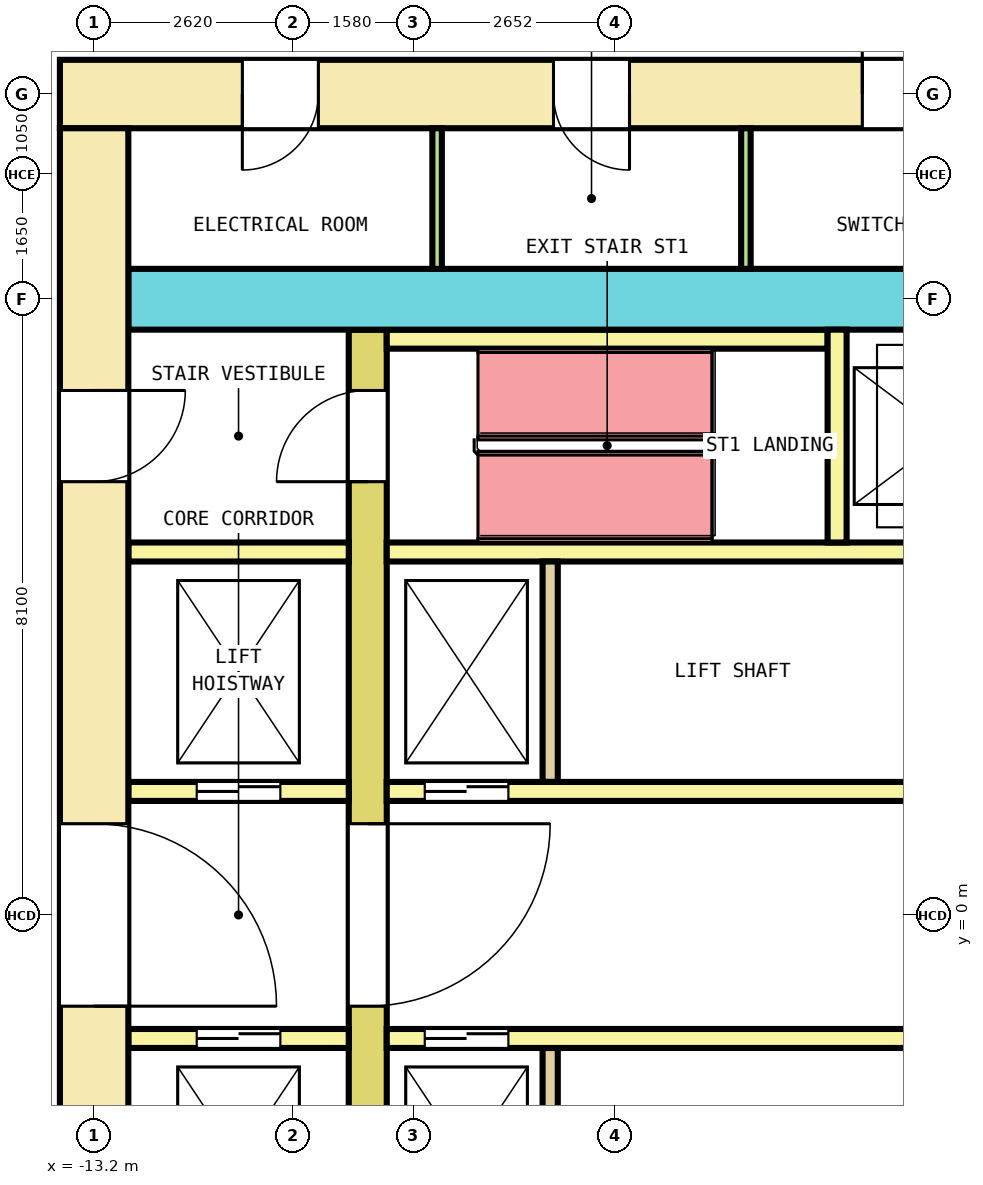
"""IFC4 building model, lengths in metres.
Left out: names, types, materials, properties, quantities, classifications, styles, units other than length and angle.
Written with IfcOpenShell. Run it as: python <this file> out.ifc"""

import sys

from ifc_helpers import new_model, si_unit, direction, frame, frame_2d, origin, place, context, subcontext, project, spatial, rectangle, extrude, element, fill, save


model = new_model("IFC4")
c1 = context("Model", 3, precision=1e-05, world=origin(), true_north=direction((0.0, 1.0)))
c2 = subcontext(c1, "Body", "Model", "MODEL_VIEW")
j1 = project(units=[si_unit("LENGTHUNIT", "METRE"), si_unit("PLANEANGLEUNIT", "RADIAN")], contexts=[c1])
p1 = place(None, origin())
s1 = spatial("IfcSite", under=j1, at=p1, CompositionType="ELEMENT")
p2 = place(p1, origin())
s2 = spatial("IfcBuilding", under=s1, at=p2, CompositionType="ELEMENT")
p3 = place(p2, frame((0.0, 0.0, 49.8)))
s3 = spatial("IfcBuildingStorey", under=s2, at=p3, CompositionType="ELEMENT", Elevation=49.8)
p4 = place(p3, frame((-13.65, 10.8, 0.0), z_axis=(0.0, 0.0, 1.0), x_axis=(1.0, 0.0, 0.0)))
e1 = element("IfcWall", 1, at=p4, inside=s3, PredefinedType="SHEAR", context=c2, shape_type="SweptSolid", body=[
    extrude(rectangle(XDim=27.3, YDim=0.9, at=frame_2d((13.65, 0.0))), origin(), (0.0, 0.0, 1.0), 4.1),
])
p5 = place(p4, frame((2.4, 0.0, 0.0)))
e2 = element("IfcOpeningElement", 2, at=p5, cuts=e1, PredefinedType="OPENING", context=c2, shape_type="SweptSolid", body=[
    extrude(rectangle(XDim=1.0, YDim=2.1, at=frame_2d((0.5, 1.05))), frame((0.0, 0.46, 0.0), z_axis=(0.0, -1.0, 0.0), x_axis=(1.0, 0.0, 0.0)), (0.0, 0.0, 1.0), 0.92),
])
p6 = place(p4, frame((6.494, 0.0, 0.0)))
e3 = element("IfcOpeningElement", 3, at=p6, cuts=e1, PredefinedType="OPENING", context=c2, shape_type="SweptSolid", body=[
    extrude(rectangle(XDim=1.0, YDim=2.1, at=frame_2d((0.5, 1.05))), frame((0.0, 0.46, 0.0), z_axis=(0.0, -1.0, 0.0), x_axis=(1.0, 0.0, 0.0)), (0.0, 0.0, 1.0), 0.92),
])
p7 = place(p4, frame((10.556, 0.0, 0.0)))
e4 = element("IfcOpeningElement", 4, at=p7, cuts=e1, PredefinedType="OPENING", context=c2, shape_type="SweptSolid", body=[
    extrude(rectangle(XDim=1.0, YDim=2.1, at=frame_2d((0.5, 1.05))), frame((0.0, 0.46, 0.0), z_axis=(0.0, -1.0, 0.0), x_axis=(1.0, 0.0, 0.0)), (0.0, 0.0, 1.0), 0.92),
])
p8 = place(p4, frame((18.077, 0.0, 0.0)))
e5 = element("IfcOpeningElement", 5, at=p8, cuts=e1, PredefinedType="OPENING", context=c2, shape_type="SweptSolid", body=[
    extrude(rectangle(XDim=1.0, YDim=2.1, at=frame_2d((0.5, 1.05))), frame((0.0, 0.46, 0.0), z_axis=(0.0, -1.0, 0.0), x_axis=(1.0, 0.0, 0.0)), (0.0, 0.0, 1.0), 0.92),
])
p9 = place(p4, frame((21.206, 0.0, 0.0)))
e6 = element("IfcOpeningElement", 6, at=p9, cuts=e1, PredefinedType="OPENING", context=c2, shape_type="SweptSolid", body=[
    extrude(rectangle(XDim=1.0, YDim=2.1, at=frame_2d((0.5, 1.05))), frame((0.0, 0.46, 0.0), z_axis=(0.0, -1.0, 0.0), x_axis=(1.0, 0.0, 0.0)), (0.0, 0.0, 1.0), 0.92),
])
p10 = place(p4, frame((24.367, 0.0, 0.0)))
e7 = element("IfcOpeningElement", 7, at=p10, cuts=e1, PredefinedType="OPENING", context=c2, shape_type="SweptSolid", body=[
    extrude(rectangle(XDim=1.0, YDim=2.1, at=frame_2d((0.5, 1.05))), frame((0.0, 0.46, 0.0), z_axis=(0.0, -1.0, 0.0), x_axis=(1.0, 0.0, 0.0)), (0.0, 0.0, 1.0), 0.92),
])
p11 = place(p4, frame((14.575, 0.0, 0.0)))
e8 = element("IfcOpeningElement", 8, at=p11, cuts=e1, PredefinedType="OPENING", context=c2, shape_type="SweptSolid", body=[
    extrude(rectangle(XDim=1.4, YDim=2.1, at=frame_2d((0.7, 1.05))), frame((0.0, 0.46, 0.0), z_axis=(0.0, -1.0, 0.0), x_axis=(1.0, 0.0, 0.0)), (0.0, 0.0, 1.0), 0.92),
])
p12 = place(p3, frame((-13.2, -10.35, 0.0), z_axis=(0.0, 0.0, 1.0), x_axis=(0.0, 1.0, 0.0)))
e9 = element("IfcWall", 9, at=p12, inside=s3, PredefinedType="SHEAR", context=c2, shape_type="SweptSolid", body=[
    extrude(rectangle(XDim=20.7, YDim=0.9, at=frame_2d((10.35, 0.0))), origin(), (0.0, 0.0, 1.0), 4.1),
])
p13 = place(p12, frame((9.15, 0.0, 0.0)))
e10 = element("IfcOpeningElement", 10, at=p13, cuts=e9, PredefinedType="OPENING", context=c2, shape_type="SweptSolid", body=[
    extrude(rectangle(XDim=2.4, YDim=2.1, at=frame_2d((1.2, 1.05))), frame((0.0, 0.46, 0.0), z_axis=(0.0, -1.0, 0.0), x_axis=(1.0, 0.0, 0.0)), (0.0, 0.0, 1.0), 0.92),
])
p14 = place(p12, frame((16.05, 0.0, 0.0)))
e11 = element("IfcOpeningElement", 11, at=p14, cuts=e9, PredefinedType="OPENING", context=c2, shape_type="SweptSolid", body=[
    extrude(rectangle(XDim=1.2, YDim=2.1, at=frame_2d((0.6, 1.05))), frame((0.0, 0.46, 0.0), z_axis=(0.0, -1.0, 0.0), x_axis=(1.0, 0.0, 0.0)), (0.0, 0.0, 1.0), 0.92),
])
p15 = place(p12, frame((3.45, 0.0, 0.0)))
e12 = element("IfcOpeningElement", 12, at=p15, cuts=e9, PredefinedType="OPENING", context=c2, shape_type="SweptSolid", body=[
    extrude(rectangle(XDim=1.2, YDim=2.1, at=frame_2d((0.6, 1.05))), frame((0.0, 0.46, 0.0), z_axis=(0.0, -1.0, 0.0), x_axis=(1.0, 0.0, 0.0)), (0.0, 0.0, 1.0), 0.92),
])
p16 = place(p3, frame((-12.75, 8.1, 0.0), z_axis=(0.0, 0.0, 1.0), x_axis=(1.0, 0.0, 0.0)))
e13 = element("IfcWall", 13, at=p16, inside=s3, PredefinedType="SHEAR", context=c2, shape_type="SweptSolid", body=[
    extrude(rectangle(XDim=25.5, YDim=0.8, at=frame_2d((12.75, 0.0))), origin(), (0.0, 0.0, 1.0), 4.1),
])
p17 = place(p16, frame((13.675, 0.0, 0.0)))
e14 = element("IfcOpeningElement", 14, at=p17, cuts=e13, PredefinedType="OPENING", context=c2, shape_type="SweptSolid", body=[
    extrude(rectangle(XDim=1.4, YDim=2.1, at=frame_2d((0.7, 1.05))), frame((0.0, 0.41, 0.0), z_axis=(0.0, -1.0, 0.0), x_axis=(1.0, 0.0, 0.0)), (0.0, 0.0, 1.0), 0.82),
])
p18 = place(p3, frame((-9.6, -7.7, 0.0), z_axis=(0.0, 0.0, 1.0), x_axis=(0.0, 1.0, 0.0)))
e15 = element("IfcWall", 15, at=p18, inside=s3, PredefinedType="SHEAR", context=c2, shape_type="SweptSolid", body=[
    extrude(rectangle(XDim=15.4, YDim=0.5, at=frame_2d((7.7, 0.0))), origin(), (0.0, 0.0, 1.0), 4.1),
])
p19 = place(p18, frame((6.5, 0.0, 0.0)))
e16 = element("IfcOpeningElement", 16, at=p19, cuts=e15, PredefinedType="OPENING", context=c2, shape_type="SweptSolid", body=[
    extrude(rectangle(XDim=2.4, YDim=2.1, at=frame_2d((1.2, 1.05))), frame((0.0, 0.26, 0.0), z_axis=(0.0, -1.0, 0.0), x_axis=(1.0, 0.0, 0.0)), (0.0, 0.0, 1.0), 0.52),
])
p20 = place(p18, frame((13.4, 0.0, 0.0)))
e17 = element("IfcOpeningElement", 17, at=p20, cuts=e15, PredefinedType="OPENING", context=c2, shape_type="SweptSolid", body=[
    extrude(rectangle(XDim=1.2, YDim=2.1, at=frame_2d((0.6, 1.05))), frame((0.0, 0.26, 0.0), z_axis=(0.0, -1.0, 0.0), x_axis=(1.0, 0.0, 0.0)), (0.0, 0.0, 1.0), 0.52),
])
p21 = place(p18, frame((0.8, 0.0, 0.0)))
e18 = element("IfcOpeningElement", 18, at=p21, cuts=e15, PredefinedType="OPENING", context=c2, shape_type="SweptSolid", body=[
    extrude(rectangle(XDim=1.2, YDim=2.1, at=frame_2d((0.6, 1.05))), frame((0.0, 0.26, 0.0), z_axis=(0.0, -1.0, 0.0), x_axis=(1.0, 0.0, 0.0)), (0.0, 0.0, 1.0), 0.52),
])
p22 = place(p3, frame((-12.75, 1.625, 0.0), z_axis=(0.0, 0.0, 1.0), x_axis=(1.0, 0.0, 0.0)))
e19 = element("IfcWall", 19, at=p22, inside=s3, PredefinedType="SOLIDWALL", context=c2, shape_type="SweptSolid", body=[
    extrude(rectangle(XDim=2.9, YDim=0.25, at=frame_2d((1.45, 0.0))), origin(), (0.0, 0.0, 1.0), 4.1),
])
p23 = place(p22, frame((0.9, 0.0, 0.0)))
e20 = element("IfcOpeningElement", 20, at=p23, cuts=e19, PredefinedType="OPENING", context=c2, shape_type="SweptSolid", body=[
    extrude(rectangle(XDim=1.1, YDim=2.1, at=frame_2d((0.55, 1.05))), frame((0.0, 0.135, 0.0), z_axis=(0.0, -1.0, 0.0), x_axis=(1.0, 0.0, 0.0)), (0.0, 0.0, 1.0), 0.27),
])
p24 = place(p3, frame((-9.35, 1.625, 0.0), z_axis=(0.0, 0.0, 1.0), x_axis=(1.0, 0.0, 0.0)))
e21 = element("IfcWall", 21, at=p24, inside=s3, PredefinedType="SOLIDWALL", context=c2, shape_type="SweptSolid", body=[
    extrude(rectangle(XDim=18.7, YDim=0.25, at=frame_2d((9.35, 0.0))), origin(), (0.0, 0.0, 1.0), 4.1),
])
p25 = place(p24, frame((0.5, 0.0, 0.0)))
e22 = element("IfcOpeningElement", 22, at=p25, cuts=e21, PredefinedType="OPENING", context=c2, shape_type="SweptSolid", body=[
    extrude(rectangle(XDim=1.1, YDim=2.1, at=frame_2d((0.55, 1.05))), frame((0.0, 0.135, 0.0), z_axis=(0.0, -1.0, 0.0), x_axis=(1.0, 0.0, 0.0)), (0.0, 0.0, 1.0), 0.27),
])
p26 = place(p24, frame((17.1, 0.0, 0.0)))
e23 = element("IfcOpeningElement", 23, at=p26, cuts=e21, PredefinedType="OPENING", context=c2, shape_type="SweptSolid", body=[
    extrude(rectangle(XDim=1.1, YDim=2.1, at=frame_2d((0.55, 1.05))), frame((0.0, 0.135, 0.0), z_axis=(0.0, -1.0, 0.0), x_axis=(1.0, 0.0, 0.0)), (0.0, 0.0, 1.0), 0.27),
])
p27 = place(p3, frame((-12.75, 4.775, 0.0), z_axis=(0.0, 0.0, 1.0), x_axis=(1.0, 0.0, 0.0)))
e24 = element("IfcWall", 24, at=p27, inside=s3, PredefinedType="SOLIDWALL", context=c2, shape_type="SweptSolid", body=[
    extrude(rectangle(XDim=2.9, YDim=0.25, at=frame_2d((1.45, 0.0))), origin(), (0.0, 0.0, 1.0), 4.1),
])
p28 = place(p3, frame((-9.35, 4.775, 0.0), z_axis=(0.0, 0.0, 1.0), x_axis=(1.0, 0.0, 0.0)))
e25 = element("IfcWall", 25, at=p28, inside=s3, PredefinedType="SOLIDWALL", context=c2, shape_type="SweptSolid", body=[
    extrude(rectangle(XDim=18.7, YDim=0.25, at=frame_2d((9.35, 0.0))), origin(), (0.0, 0.0, 1.0), 4.1),
])
p29 = place(p3, frame((-7.2, 1.75, 0.0), z_axis=(0.0, 0.0, 1.0), x_axis=(0.0, 1.0, 0.0)))
e26 = element("IfcWall", 26, at=p29, inside=s3, PredefinedType="SOLIDWALL", context=c2, shape_type="SweptSolid", body=[
    extrude(rectangle(XDim=2.9, YDim=0.2, at=frame_2d((1.45, 0.0))), origin(), (0.0, 0.0, 1.0), 4.1),
])
p30 = place(p3, frame((-12.75, -1.625, 0.0), z_axis=(0.0, 0.0, 1.0), x_axis=(1.0, 0.0, 0.0)))
e27 = element("IfcWall", 27, at=p30, inside=s3, PredefinedType="SOLIDWALL", context=c2, shape_type="SweptSolid", body=[
    extrude(rectangle(XDim=2.9, YDim=0.25, at=frame_2d((1.45, 0.0))), origin(), (0.0, 0.0, 1.0), 4.1),
])
p31 = place(p30, frame((0.9, 0.0, 0.0)))
e28 = element("IfcOpeningElement", 28, at=p31, cuts=e27, PredefinedType="OPENING", context=c2, shape_type="SweptSolid", body=[
    extrude(rectangle(XDim=1.1, YDim=2.1, at=frame_2d((0.55, 1.05))), frame((0.0, 0.135, 0.0), z_axis=(0.0, -1.0, 0.0), x_axis=(1.0, 0.0, 0.0)), (0.0, 0.0, 1.0), 0.27),
])
p32 = place(p3, frame((-9.35, -1.625, 0.0), z_axis=(0.0, 0.0, 1.0), x_axis=(1.0, 0.0, 0.0)))
e29 = element("IfcWall", 29, at=p32, inside=s3, PredefinedType="SOLIDWALL", context=c2, shape_type="SweptSolid", body=[
    extrude(rectangle(XDim=18.7, YDim=0.25, at=frame_2d((9.35, 0.0))), origin(), (0.0, 0.0, 1.0), 4.1),
])
p33 = place(p32, frame((0.5, 0.0, 0.0)))
e30 = element("IfcOpeningElement", 30, at=p33, cuts=e29, PredefinedType="OPENING", context=c2, shape_type="SweptSolid", body=[
    extrude(rectangle(XDim=1.1, YDim=2.1, at=frame_2d((0.55, 1.05))), frame((0.0, 0.135, 0.0), z_axis=(0.0, -1.0, 0.0), x_axis=(1.0, 0.0, 0.0)), (0.0, 0.0, 1.0), 0.27),
])
p34 = place(p32, frame((17.1, 0.0, 0.0)))
e31 = element("IfcOpeningElement", 31, at=p34, cuts=e29, PredefinedType="OPENING", context=c2, shape_type="SweptSolid", body=[
    extrude(rectangle(XDim=1.1, YDim=2.1, at=frame_2d((0.55, 1.05))), frame((0.0, 0.135, 0.0), z_axis=(0.0, -1.0, 0.0), x_axis=(1.0, 0.0, 0.0)), (0.0, 0.0, 1.0), 0.27),
])
p35 = place(p3, frame((-7.2, -4.65, 0.0), z_axis=(0.0, 0.0, 1.0), x_axis=(0.0, 1.0, 0.0)))
e32 = element("IfcWall", 32, at=p35, inside=s3, PredefinedType="SOLIDWALL", context=c2, shape_type="SweptSolid", body=[
    extrude(rectangle(XDim=2.9, YDim=0.2, at=frame_2d((1.45, 0.0))), origin(), (0.0, 0.0, 1.0), 4.1),
])
p36 = place(p3, frame((-9.35, 7.575, 0.0), z_axis=(0.0, 0.0, 1.0), x_axis=(1.0, 0.0, 0.0)))
e33 = element("IfcWall", 33, at=p36, inside=s3, PredefinedType="SOLIDWALL", context=c2, shape_type="SweptSolid", body=[
    extrude(rectangle(XDim=5.8, YDim=0.25, at=frame_2d((2.9, 0.0))), origin(), (0.0, 0.0, 1.0), 4.1),
])
p37 = place(p3, frame((-3.425, 4.9, 0.0), z_axis=(0.0, 0.0, 1.0), x_axis=(0.0, 1.0, 0.0)))
e34 = element("IfcWall", 34, at=p37, inside=s3, PredefinedType="SOLIDWALL", context=c2, shape_type="SweptSolid", body=[
    extrude(rectangle(XDim=2.8, YDim=0.25, at=frame_2d((1.4, 0.0))), origin(), (0.0, 0.0, 1.0), 4.1),
])
for number, where, z_axis, x_axis in (
    (35, (-8.688, 8.5, 0.0), (0.0, 0.0, 1.0), (0.0, 1.0, 0.0)),
    (36, (-4.625, 8.5, 0.0), (0.0, 0.0, 1.0), (0.0, 1.0, 0.0)),
):
    element("IfcWall", number, at=place(p3, frame(where, z_axis=z_axis, x_axis=x_axis)), inside=s3, PredefinedType="PARTITIONING", context=c2, shape_type="SweptSolid", body=[
        extrude(rectangle(XDim=1.85, YDim=0.125, at=frame_2d((0.925, 0.0))), origin(), (0.0, 0.0, 1.0), 4.1),
    ])
p38 = place(p23, origin())
e37 = element("IfcDoor", 37, at=p38, inside=s3, OperationType="DOUBLE_DOOR_SLIDING", PredefinedType="DOOR", context=c2, shape_type="SweptSolid", body=[
    extrude(rectangle(XDim=1.1, YDim=2.1, at=frame_2d((0.55, 1.05))), frame((0.0, 0.075, 0.0), z_axis=(0.0, -1.0, 0.0), x_axis=(1.0, 0.0, 0.0)), (0.0, 0.0, 1.0), 0.15),
])
fill(e20, e37)
p39 = place(p25, origin())
e38 = element("IfcDoor", 38, at=p39, inside=s3, OperationType="DOUBLE_DOOR_SLIDING", PredefinedType="DOOR", context=c2, shape_type="SweptSolid", body=[
    extrude(rectangle(XDim=1.1, YDim=2.1, at=frame_2d((0.55, 1.05))), frame((0.0, 0.075, 0.0), z_axis=(0.0, -1.0, 0.0), x_axis=(1.0, 0.0, 0.0)), (0.0, 0.0, 1.0), 0.15),
])
fill(e22, e38)
p40 = place(p31, origin())
e39 = element("IfcDoor", 39, at=p40, inside=s3, OperationType="DOUBLE_DOOR_SLIDING", PredefinedType="DOOR", context=c2, shape_type="SweptSolid", body=[
    extrude(rectangle(XDim=1.1, YDim=2.1, at=frame_2d((0.55, 1.05))), frame((0.0, 0.075, 0.0), z_axis=(0.0, -1.0, 0.0), x_axis=(1.0, 0.0, 0.0)), (0.0, 0.0, 1.0), 0.15),
])
fill(e28, e39)
p41 = place(p33, origin())
e40 = element("IfcDoor", 40, at=p41, inside=s3, OperationType="DOUBLE_DOOR_SLIDING", PredefinedType="DOOR", context=c2, shape_type="SweptSolid", body=[
    extrude(rectangle(XDim=1.1, YDim=2.1, at=frame_2d((0.55, 1.05))), frame((0.0, 0.075, 0.0), z_axis=(0.0, -1.0, 0.0), x_axis=(1.0, 0.0, 0.0)), (0.0, 0.0, 1.0), 0.15),
])
fill(e30, e40)
p42 = place(p19, origin())
e41 = element("IfcDoor", 41, at=p42, inside=s3, OperationType="DOUBLE_DOOR_SINGLE_SWING", PredefinedType="DOOR", context=c2, shape_type="SweptSolid", body=[
    extrude(rectangle(XDim=2.4, YDim=2.1, at=frame_2d((1.2, 1.05))), frame((0.0, 0.2, 0.0), z_axis=(0.0, -1.0, 0.0), x_axis=(1.0, 0.0, 0.0)), (0.0, 0.0, 1.0), 0.4),
])
fill(e16, e41)
p43 = place(p13, origin())
e42 = element("IfcDoor", 42, at=p43, inside=s3, OperationType="DOUBLE_DOOR_SINGLE_SWING", PredefinedType="DOOR", context=c2, shape_type="SweptSolid", body=[
    extrude(rectangle(XDim=2.4, YDim=2.1, at=frame_2d((1.2, 1.05))), frame((0.0, 0.3, 0.0), z_axis=(0.0, -1.0, 0.0), x_axis=(1.0, 0.0, 0.0)), (0.0, 0.0, 1.0), 0.6),
])
fill(e10, e42)
p44 = place(p20, origin())
e43 = element("IfcDoor", 43, at=p44, inside=s3, OperationType="SINGLE_SWING_RIGHT", PredefinedType="DOOR", context=c2, shape_type="SweptSolid", body=[
    extrude(rectangle(XDim=1.2, YDim=2.1, at=frame_2d((0.6, 1.05))), frame((0.0, 0.2, 0.0), z_axis=(0.0, -1.0, 0.0), x_axis=(1.0, 0.0, 0.0)), (0.0, 0.0, 1.0), 0.4),
])
fill(e17, e43)
p45 = place(p14, origin())
e44 = element("IfcDoor", 44, at=p45, inside=s3, OperationType="SINGLE_SWING_LEFT", PredefinedType="DOOR", context=c2, shape_type="SweptSolid", body=[
    extrude(rectangle(XDim=1.2, YDim=2.1, at=frame_2d((0.6, 1.05))), frame((0.0, 0.3, 0.0), z_axis=(0.0, -1.0, 0.0), x_axis=(1.0, 0.0, 0.0)), (0.0, 0.0, 1.0), 0.6),
])
fill(e11, e44)
p46 = place(p5, origin())
e45 = element("IfcDoor", 45, at=p46, inside=s3, OperationType="SINGLE_SWING_RIGHT", PredefinedType="DOOR", context=c2, shape_type="SweptSolid", body=[
    extrude(rectangle(XDim=1.0, YDim=2.1, at=frame_2d((0.5, 1.05))), frame((0.0, 0.3, 0.0), z_axis=(0.0, -1.0, 0.0), x_axis=(1.0, 0.0, 0.0)), (0.0, 0.0, 1.0), 0.6),
])
fill(e2, e45)
p47 = place(p6, origin())
e46 = element("IfcDoor", 46, at=p47, inside=s3, OperationType="SINGLE_SWING_LEFT", PredefinedType="DOOR", context=c2, shape_type="SweptSolid", body=[
    extrude(rectangle(XDim=1.0, YDim=2.1, at=frame_2d((0.5, 1.05))), frame((0.0, 0.3, 0.0), z_axis=(0.0, -1.0, 0.0), x_axis=(1.0, 0.0, 0.0)), (0.0, 0.0, 1.0), 0.6),
])
fill(e3, e46)
p48 = place(p7, origin())
e47 = element("IfcDoor", 47, at=p48, inside=s3, OperationType="SINGLE_SWING_RIGHT", PredefinedType="DOOR", context=c2, shape_type="SweptSolid", body=[
    extrude(rectangle(XDim=1.0, YDim=2.1, at=frame_2d((0.5, 1.05))), frame((0.0, 0.3, 0.0), z_axis=(0.0, -1.0, 0.0), x_axis=(1.0, 0.0, 0.0)), (0.0, 0.0, 1.0), 0.6),
])
fill(e4, e47)
save(model, sys.argv[1])
